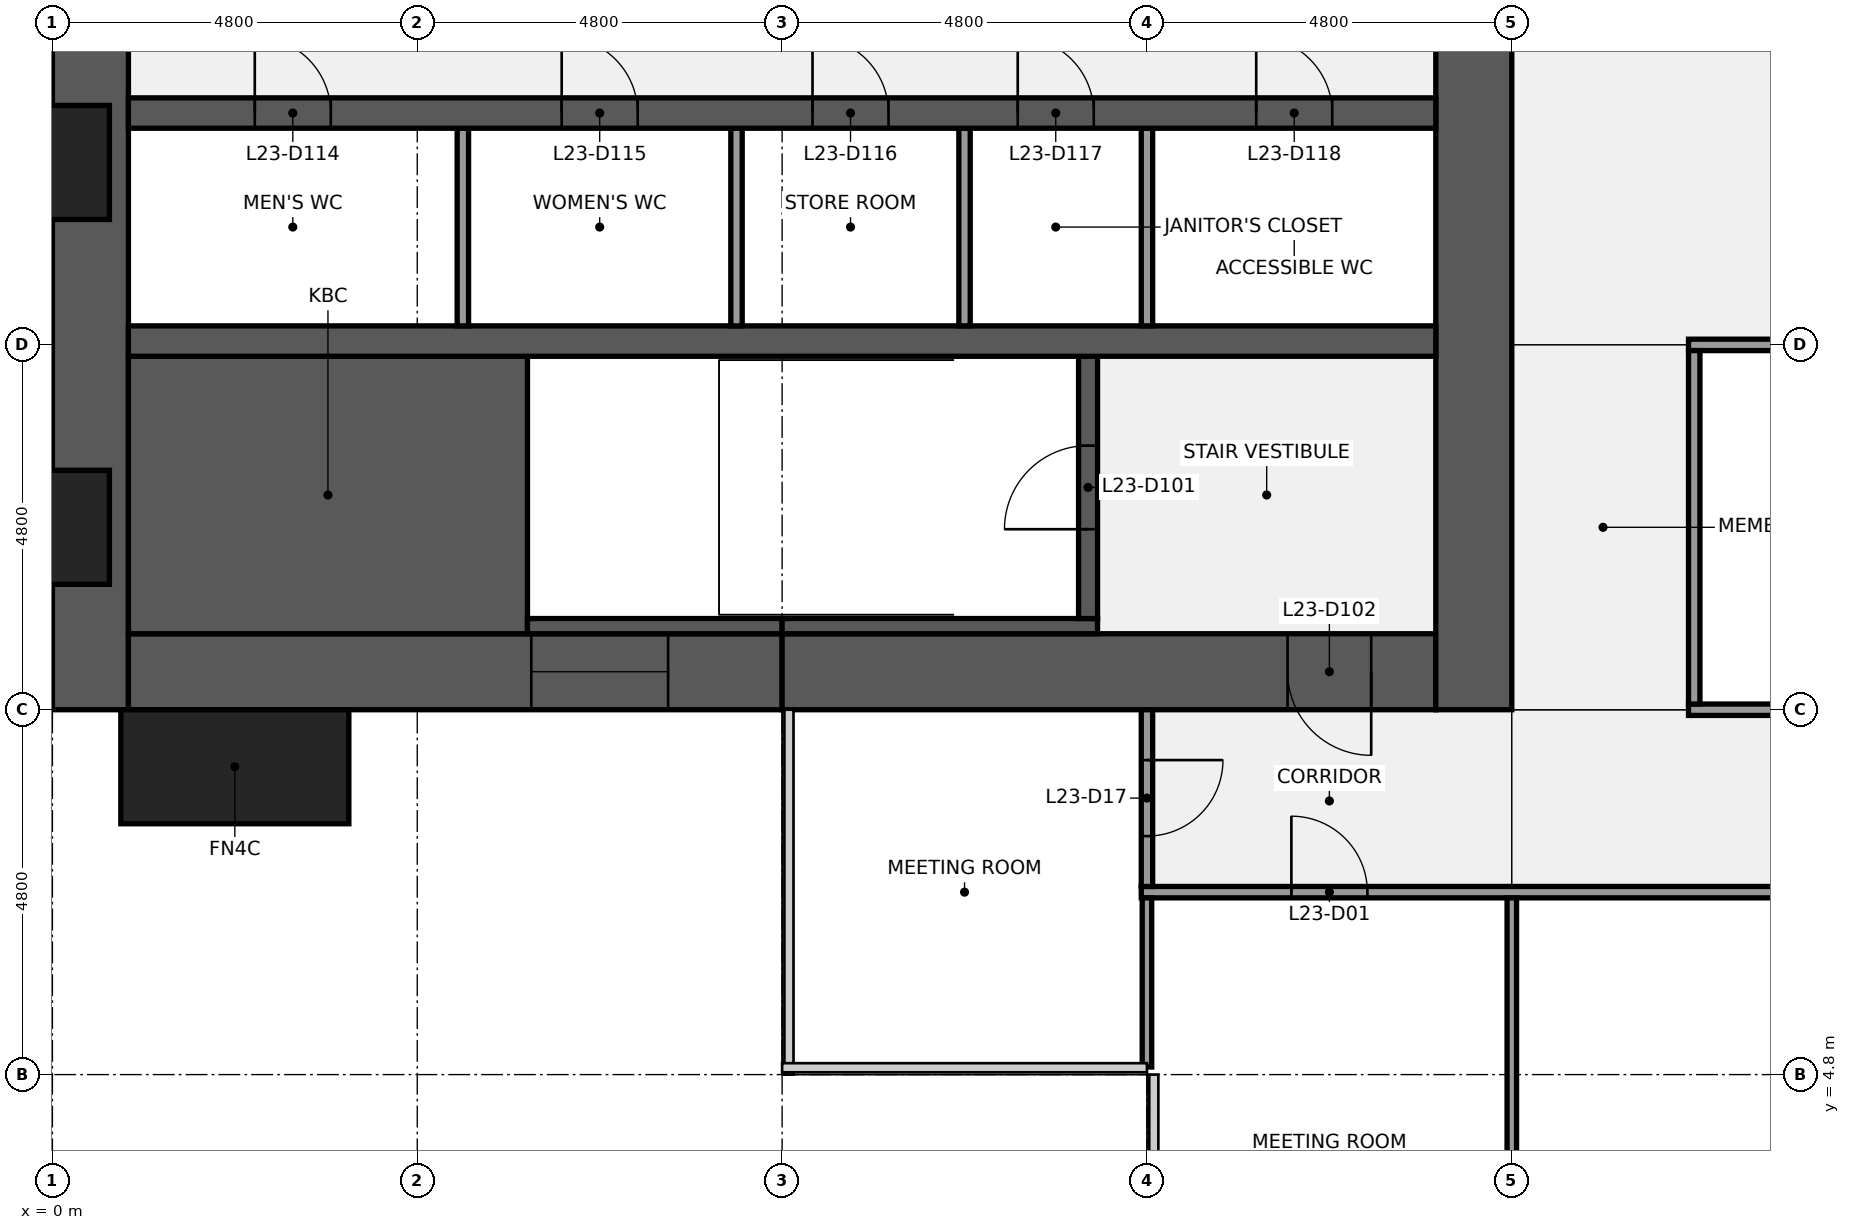
"""IFC4 building model, lengths in metres.
Left out: names, types, materials, properties, quantities, classifications, styles, units other than length and angle.
Written with IfcOpenShell. Run it as: python <this file> out.ifc"""

import sys

from ifc_helpers import new_model, si_unit, direction, frame, frame_2d, origin, origin_2d, place, context, subcontext, project, spatial, rectangle, extrude, element, fill, save


model = new_model("IFC4")
c1 = context("Model", 3, precision=1e-05, world=origin(), true_north=direction((0.0, 1.0)))
c2 = subcontext(c1, "Body", "Model", "MODEL_VIEW")
j1 = project(units=[si_unit("LENGTHUNIT", "METRE"), si_unit("PLANEANGLEUNIT", "RADIAN")], contexts=[c1])
p1 = place(None, origin())
s1 = spatial("IfcSite", under=j1, at=p1, CompositionType="ELEMENT")
p2 = place(p1, origin())
s2 = spatial("IfcBuilding", under=s1, at=p2, CompositionType="ELEMENT")
p3 = place(p2, frame((0.0, 0.0, 112.1)))
s3 = spatial("IfcBuildingStorey", under=s2, at=p3, CompositionType="ELEMENT", Elevation=112.1)
p4 = place(p3, frame((0.5, 9.6, 0.0), z_axis=(0.0, 0.0, 1.0), x_axis=(0.0, 1.0, 0.0)))
e1 = element("IfcWall", 1, at=p4, inside=s3, PredefinedType="SHEAR", context=c2, shape_type="SweptSolid", body=[
    extrude(rectangle(XDim=28.8, YDim=1.0, at=frame_2d((14.4, 0.0))), origin(), (0.0, 0.0, 1.0), 3.84),
])
p5 = place(p4, frame((8.85, 0.0, 0.9)))
e2 = element("IfcOpeningElement", 2, at=p5, cuts=e1, PredefinedType="OPENING", context=c2, shape_type="SweptSolid", body=[
    extrude(rectangle(XDim=1.5, YDim=1.5, at=frame_2d((0.75, 0.75))), frame((0.0, 0.51, 0.0), z_axis=(0.0, -1.0, 0.0), x_axis=(1.0, 0.0, 0.0)), (0.0, 0.0, 1.0), 1.02),
])
p6 = place(p4, frame((18.45, 0.0, 0.9)))
e3 = element("IfcOpeningElement", 3, at=p6, cuts=e1, PredefinedType="OPENING", context=c2, shape_type="SweptSolid", body=[
    extrude(rectangle(XDim=1.5, YDim=1.5, at=frame_2d((0.75, 0.75))), frame((0.0, 0.51, 0.0), z_axis=(0.0, -1.0, 0.0), x_axis=(1.0, 0.0, 0.0)), (0.0, 0.0, 1.0), 1.02),
])
p7 = place(p3, frame((9.6, 10.1, 0.0), z_axis=(0.0, 0.0, 1.0), x_axis=(-1.0, 0.0, 0.0)))
e4 = element("IfcWall", 4, at=p7, inside=s3, PredefinedType="SHEAR", context=c2, shape_type="SweptSolid", body=[
    extrude(rectangle(XDim=8.6, YDim=1.0, at=frame_2d((4.3, 0.0))), origin(), (0.0, 0.0, 1.0), 3.84),
])
p8 = place(p7, frame((1.5, 0.0, 0.9)))
e5 = element("IfcOpeningElement", 5, at=p8, cuts=e4, PredefinedType="OPENING", context=c2, shape_type="SweptSolid", body=[
    extrude(rectangle(XDim=1.8, YDim=1.5, at=frame_2d((0.9, 0.75))), frame((0.0, 0.51, 0.0), z_axis=(0.0, -1.0, 0.0), x_axis=(1.0, 0.0, 0.0)), (0.0, 0.0, 1.0), 1.02),
])
p9 = place(p3, frame((18.2, 10.1, 0.0), z_axis=(0.0, 0.0, 1.0), x_axis=(-1.0, 0.0, 0.0)))
e6 = element("IfcWall", 6, at=p9, inside=s3, PredefinedType="SHEAR", context=c2, shape_type="SweptSolid", body=[
    extrude(rectangle(XDim=8.6, YDim=1.0, at=frame_2d((4.3, 0.0))), origin(), (0.0, 0.0, 1.0), 3.84),
])
p10 = place(p9, frame((0.85, 0.0, 0.0)))
e7 = element("IfcOpeningElement", 7, at=p10, cuts=e6, PredefinedType="OPENING", context=c2, shape_type="SweptSolid", body=[
    extrude(rectangle(XDim=1.1, YDim=2.1, at=frame_2d((0.55, 1.05))), frame((0.0, 0.51, 0.0), z_axis=(0.0, -1.0, 0.0), x_axis=(1.0, 0.0, 0.0)), (0.0, 0.0, 1.0), 1.02),
])
p11 = place(p3, frame((18.7, 38.4, 0.0), z_axis=(0.0, 0.0, 1.0), x_axis=(0.0, -1.0, 0.0)))
e8 = element("IfcWall", 8, at=p11, inside=s3, PredefinedType="SHEAR", context=c2, shape_type="SweptSolid", body=[
    extrude(rectangle(XDim=28.8, YDim=1.0, at=frame_2d((14.4, 0.0))), origin(), (0.0, 0.0, 1.0), 3.84),
])
p12 = place(p11, frame((18.3, 0.0, 0.0)))
e9 = element("IfcOpeningElement", 9, at=p12, cuts=e8, PredefinedType="OPENING", context=c2, shape_type="SweptSolid", body=[
    extrude(rectangle(XDim=1.8, YDim=2.1, at=frame_2d((0.9, 1.05))), frame((0.0, 0.51, 0.0), z_axis=(0.0, -1.0, 0.0), x_axis=(1.0, 0.0, 0.0)), (0.0, 0.0, 1.0), 1.02),
])
p13 = place(p11, frame((8.7, 0.0, 0.0)))
e10 = element("IfcOpeningElement", 10, at=p13, cuts=e8, PredefinedType="OPENING", context=c2, shape_type="SweptSolid", body=[
    extrude(rectangle(XDim=1.8, YDim=2.1, at=frame_2d((0.9, 1.05))), frame((0.0, 0.51, 0.0), z_axis=(0.0, -1.0, 0.0), x_axis=(1.0, 0.0, 0.0)), (0.0, 0.0, 1.0), 1.02),
])
p14 = place(p3, frame((1.0, 12.425, 0.0), z_axis=(0.0, 0.0, 1.0), x_axis=(1.0, 0.0, 0.0)))
e11 = element("IfcWall", 11, at=p14, inside=s3, PredefinedType="SHEAR", context=c2, shape_type="SweptSolid", body=[
    extrude(rectangle(XDim=5.25, YDim=3.65, at=frame_2d((2.625, 0.0))), origin(), (0.0, 0.0, 1.0), 3.84),
])
p15 = place(p3, frame((6.25, 10.7, 0.0), z_axis=(0.0, 0.0, 1.0), x_axis=(1.0, 0.0, 0.0)))
e12 = element("IfcWall", 12, at=p15, inside=s3, PredefinedType="SHEAR", context=c2, shape_type="SweptSolid", body=[
    extrude(rectangle(XDim=3.35, YDim=0.2, at=frame_2d((1.675, 0.0))), origin(), (0.0, 0.0, 1.0), 3.84),
])
p16 = place(p3, frame((9.6, 10.7, 0.0), z_axis=(0.0, 0.0, 1.0), x_axis=(1.0, 0.0, 0.0)))
e13 = element("IfcWall", 13, at=p16, inside=s3, PredefinedType="SHEAR", context=c2, shape_type="SweptSolid", body=[
    extrude(rectangle(XDim=4.15, YDim=0.2, at=frame_2d((2.075, 0.0))), origin(), (0.0, 0.0, 1.0), 3.84),
])
p17 = place(p3, frame((13.625, 10.8, 0.0), z_axis=(0.0, 0.0, 1.0), x_axis=(0.0, 1.0, 0.0)))
e14 = element("IfcWall", 14, at=p17, inside=s3, PredefinedType="SHEAR", context=c2, shape_type="SweptSolid", body=[
    extrude(rectangle(XDim=3.45, YDim=0.25, at=frame_2d((1.725, 0.0))), origin(), (0.0, 0.0, 1.0), 3.84),
])
p18 = place(p17, frame((1.175, 0.0, 0.0)))
e15 = element("IfcOpeningElement", 15, at=p18, cuts=e14, PredefinedType="OPENING", context=c2, shape_type="SweptSolid", body=[
    extrude(rectangle(XDim=1.1, YDim=2.1, at=frame_2d((0.55, 1.05))), frame((0.0, 0.135, 0.0), z_axis=(0.0, -1.0, 0.0), x_axis=(1.0, 0.0, 0.0)), (0.0, 0.0, 1.0), 0.27),
])
p19 = place(p3, frame((1.0, 14.45, 0.0), z_axis=(0.0, 0.0, 1.0), x_axis=(1.0, 0.0, 0.0)))
e16 = element("IfcWall", 16, at=p19, inside=s3, PredefinedType="SHEAR", context=c2, shape_type="SweptSolid", body=[
    extrude(rectangle(XDim=17.2, YDim=0.4, at=frame_2d((8.6, 0.0))), origin(), (0.0, 0.0, 1.0), 3.84),
])
for number, where, z_axis, x_axis in (
    (17, (5.4, 14.65, 0.0), (0.0, 0.0, 1.0), (0.0, 1.0, 0.0)),
    (18, (9.0, 14.65, 0.0), (0.0, 0.0, 1.0), (0.0, 1.0, 0.0)),
    (19, (12.0, 14.65, 0.0), (0.0, 0.0, 1.0), (0.0, 1.0, 0.0)),
    (20, (14.4, 14.65, 0.0), (0.0, 0.0, 1.0), (0.0, 1.0, 0.0)),
):
    element("IfcWall", number, at=place(p3, frame(where, z_axis=z_axis, x_axis=x_axis)), inside=s3, PredefinedType="PARTITIONING", context=c2, shape_type="SweptSolid", body=[
        extrude(rectangle(XDim=2.6, YDim=0.15, at=frame_2d((1.3, 0.0))), origin(), (0.0, 0.0, 1.0), 3.84),
    ])
p20 = place(p3, frame((1.0, 17.45, 0.0), z_axis=(0.0, 0.0, 1.0), x_axis=(1.0, 0.0, 0.0)))
e21 = element("IfcWall", 21, at=p20, inside=s3, PredefinedType="SHEAR", context=c2, shape_type="SweptSolid", body=[
    extrude(rectangle(XDim=17.2, YDim=0.4, at=frame_2d((8.6, 0.0))), origin(), (0.0, 0.0, 1.0), 3.84),
])
p21 = place(p20, frame((1.663, 0.0, 0.0)))
e22 = element("IfcOpeningElement", 22, at=p21, cuts=e21, PredefinedType="OPENING", context=c2, shape_type="SweptSolid", body=[
    extrude(rectangle(XDim=1.0, YDim=2.1, at=frame_2d((0.5, 1.05))), frame((0.0, 0.21, 0.0), z_axis=(0.0, -1.0, 0.0), x_axis=(1.0, 0.0, 0.0)), (0.0, 0.0, 1.0), 0.42),
])
p22 = place(p20, frame((5.7, 0.0, 0.0)))
e23 = element("IfcOpeningElement", 23, at=p22, cuts=e21, PredefinedType="OPENING", context=c2, shape_type="SweptSolid", body=[
    extrude(rectangle(XDim=1.0, YDim=2.1, at=frame_2d((0.5, 1.05))), frame((0.0, 0.21, 0.0), z_axis=(0.0, -1.0, 0.0), x_axis=(1.0, 0.0, 0.0)), (0.0, 0.0, 1.0), 0.42),
])
p23 = place(p20, frame((9.0, 0.0, 0.0)))
e24 = element("IfcOpeningElement", 24, at=p23, cuts=e21, PredefinedType="OPENING", context=c2, shape_type="SweptSolid", body=[
    extrude(rectangle(XDim=1.0, YDim=2.1, at=frame_2d((0.5, 1.05))), frame((0.0, 0.21, 0.0), z_axis=(0.0, -1.0, 0.0), x_axis=(1.0, 0.0, 0.0)), (0.0, 0.0, 1.0), 0.42),
])
p24 = place(p20, frame((11.7, 0.0, 0.0)))
e25 = element("IfcOpeningElement", 25, at=p24, cuts=e21, PredefinedType="OPENING", context=c2, shape_type="SweptSolid", body=[
    extrude(rectangle(XDim=1.0, YDim=2.1, at=frame_2d((0.5, 1.05))), frame((0.0, 0.21, 0.0), z_axis=(0.0, -1.0, 0.0), x_axis=(1.0, 0.0, 0.0)), (0.0, 0.0, 1.0), 0.42),
])
p25 = place(p20, frame((14.837, 0.0, 0.0)))
e26 = element("IfcOpeningElement", 26, at=p25, cuts=e21, PredefinedType="OPENING", context=c2, shape_type="SweptSolid", body=[
    extrude(rectangle(XDim=1.0, YDim=2.1, at=frame_2d((0.5, 1.05))), frame((0.0, 0.21, 0.0), z_axis=(0.0, -1.0, 0.0), x_axis=(1.0, 0.0, 0.0)), (0.0, 0.0, 1.0), 0.42),
])
p26 = place(p3, frame((14.325, 7.2, 0.0), z_axis=(0.0, 0.0, 1.0), x_axis=(1.0, 0.0, 0.0)))
e27 = element("IfcWall", 27, at=p26, inside=s3, PredefinedType="PARTITIONING", context=c2, shape_type="SweptSolid", body=[
    extrude(rectangle(XDim=28.95, YDim=0.15, at=frame_2d((14.475, 0.0))), origin(), (0.0, 0.0, 1.0), 2.849),
])
p27 = place(p26, frame((1.975, 0.0, 0.0)))
e28 = element("IfcOpeningElement", 28, at=p27, cuts=e27, PredefinedType="OPENING", context=c2, shape_type="SweptSolid", body=[
    extrude(rectangle(XDim=1.0, YDim=2.1, at=frame_2d((0.5, 1.05))), frame((0.0, 0.085, 0.0), z_axis=(0.0, -1.0, 0.0), x_axis=(1.0, 0.0, 0.0)), (0.0, 0.0, 1.0), 0.17),
])
p28 = place(p26, frame((9.175, 0.0, 0.0)))
e29 = element("IfcOpeningElement", 29, at=p28, cuts=e27, PredefinedType="OPENING", context=c2, shape_type="SweptSolid", body=[
    extrude(rectangle(XDim=1.0, YDim=2.1, at=frame_2d((0.5, 1.05))), frame((0.0, 0.085, 0.0), z_axis=(0.0, -1.0, 0.0), x_axis=(1.0, 0.0, 0.0)), (0.0, 0.0, 1.0), 0.17),
])
p29 = place(p26, frame((18.775, 0.0, 0.0)))
e30 = element("IfcOpeningElement", 30, at=p29, cuts=e27, PredefinedType="OPENING", context=c2, shape_type="SweptSolid", body=[
    extrude(rectangle(XDim=1.0, YDim=2.1, at=frame_2d((0.5, 1.05))), frame((0.0, 0.085, 0.0), z_axis=(0.0, -1.0, 0.0), x_axis=(1.0, 0.0, 0.0)), (0.0, 0.0, 1.0), 0.17),
])
p30 = place(p26, frame((25.975, 0.0, 0.0)))
e31 = element("IfcOpeningElement", 31, at=p30, cuts=e27, PredefinedType="OPENING", context=c2, shape_type="SweptSolid", body=[
    extrude(rectangle(XDim=1.0, YDim=2.1, at=frame_2d((0.5, 1.05))), frame((0.0, 0.085, 0.0), z_axis=(0.0, -1.0, 0.0), x_axis=(1.0, 0.0, 0.0)), (0.0, 0.0, 1.0), 0.17),
])
p31 = place(p3, frame((21.525, 9.6, 0.0), z_axis=(0.0, 0.0, 1.0), x_axis=(1.0, 0.0, 0.0)))
e32 = element("IfcWall", 32, at=p31, inside=s3, PredefinedType="PARTITIONING", context=c2, shape_type="SweptSolid", body=[
    extrude(rectangle(XDim=14.55, YDim=0.15, at=frame_2d((7.275, 0.0))), origin(), (0.0, 0.0, 1.0), 2.849),
])
p32 = place(p31, frame((3.175, 0.0, 0.0)))
e33 = element("IfcOpeningElement", 33, at=p32, cuts=e32, PredefinedType="OPENING", context=c2, shape_type="SweptSolid", body=[
    extrude(rectangle(XDim=1.0, YDim=2.1, at=frame_2d((0.5, 1.05))), frame((0.0, 0.085, 0.0), z_axis=(0.0, -1.0, 0.0), x_axis=(1.0, 0.0, 0.0)), (0.0, 0.0, 1.0), 0.17),
])
p33 = place(p31, frame((10.375, 0.0, 0.0)))
e34 = element("IfcOpeningElement", 34, at=p33, cuts=e32, PredefinedType="OPENING", context=c2, shape_type="SweptSolid", body=[
    extrude(rectangle(XDim=1.0, YDim=2.1, at=frame_2d((0.5, 1.05))), frame((0.0, 0.085, 0.0), z_axis=(0.0, -1.0, 0.0), x_axis=(1.0, 0.0, 0.0)), (0.0, 0.0, 1.0), 0.17),
])
p34 = place(p3, frame((21.525, 14.4, 0.0), z_axis=(0.0, 0.0, 1.0), x_axis=(1.0, 0.0, 0.0)))
e35 = element("IfcWall", 35, at=p34, inside=s3, PredefinedType="PARTITIONING", context=c2, shape_type="SweptSolid", body=[
    extrude(rectangle(XDim=2.55, YDim=0.15, at=frame_2d((1.275, 0.0))), origin(), (0.0, 0.0, 1.0), 2.849),
])
p35 = place(p3, frame((14.4, 4.9, 0.0), z_axis=(0.0, 0.0, 1.0), x_axis=(0.0, 1.0, 0.0)))
e36 = element("IfcWall", 36, at=p35, inside=s3, PredefinedType="PARTITIONING", context=c2, shape_type="SweptSolid", body=[
    extrude(rectangle(XDim=2.225, YDim=0.125, at=frame_2d((1.113, 0.0))), origin(), (0.0, 0.0, 1.0), 2.849),
])
p36 = place(p3, frame((14.4, 7.275, 0.0), z_axis=(0.0, 0.0, 1.0), x_axis=(0.0, 1.0, 0.0)))
e37 = element("IfcWall", 37, at=p36, inside=s3, PredefinedType="PARTITIONING", context=c2, shape_type="SweptSolid", body=[
    extrude(rectangle(XDim=2.325, YDim=0.15, at=frame_2d((1.163, 0.0))), origin(), (0.0, 0.0, 1.0), 2.849),
])
p37 = place(p36, frame((0.663, 0.0, 0.0)))
e38 = element("IfcOpeningElement", 38, at=p37, cuts=e37, PredefinedType="OPENING", context=c2, shape_type="SweptSolid", body=[
    extrude(rectangle(XDim=1.0, YDim=2.1, at=frame_2d((0.5, 1.05))), frame((0.0, 0.085, 0.0), z_axis=(0.0, -1.0, 0.0), x_axis=(1.0, 0.0, 0.0)), (0.0, 0.0, 1.0), 0.17),
])
p38 = place(p3, frame((19.2, 0.6, 0.0), z_axis=(0.0, 0.0, 1.0), x_axis=(0.0, 1.0, 0.0)))
e39 = element("IfcWall", 39, at=p38, inside=s3, PredefinedType="PARTITIONING", context=c2, shape_type="SweptSolid", body=[
    extrude(rectangle(XDim=6.525, YDim=0.125, at=frame_2d((3.262, 0.0))), origin(), (0.0, 0.0, 1.0), 2.849),
])
p39 = place(p3, frame((21.6, 9.675, 0.0), z_axis=(0.0, 0.0, 1.0), x_axis=(0.0, 1.0, 0.0)))
e40 = element("IfcWall", 40, at=p39, inside=s3, PredefinedType="PARTITIONING", context=c2, shape_type="SweptSolid", body=[
    extrude(rectangle(XDim=4.65, YDim=0.15, at=frame_2d((2.325, 0.0))), origin(), (0.0, 0.0, 1.0), 2.849),
])
p40 = place(p3, frame((2.4, 8.85, 0.0), z_axis=(0.0, 0.0, 1.0), x_axis=(1.0, 0.0, 0.0)))
e41 = element("IfcColumn", 41, at=p40, inside=s3, PredefinedType="PILASTER", context=c2, shape_type="SweptSolid", body=[
    extrude(rectangle(XDim=3.0, YDim=1.5, at=origin_2d()), origin(), (0.0, 0.0, 1.0), 4.0),
])
p41 = place(p18, origin())
e42 = element("IfcDoor", 42, at=p41, inside=s3, OperationType="SINGLE_SWING_LEFT", PredefinedType="DOOR", context=c2, shape_type="SweptSolid", body=[
    extrude(rectangle(XDim=1.1, YDim=2.1, at=frame_2d((0.55, 1.05))), frame((0.0, 0.025, 0.0), z_axis=(0.0, -1.0, 0.0), x_axis=(1.0, 0.0, 0.0)), (0.0, 0.0, 1.0), 0.05),
])
fill(e15, e42)
p42 = place(p10, origin())
e43 = element("IfcDoor", 43, at=p42, inside=s3, OperationType="SINGLE_SWING_LEFT", PredefinedType="DOOR", context=c2, shape_type="SweptSolid", body=[
    extrude(rectangle(XDim=1.1, YDim=2.1, at=frame_2d((0.55, 1.05))), frame((0.0, 0.025, 0.0), z_axis=(0.0, -1.0, 0.0), x_axis=(1.0, 0.0, 0.0)), (0.0, 0.0, 1.0), 0.05),
])
fill(e7, e43)
p43 = place(p21, origin())
e44 = element("IfcDoor", 44, at=p43, inside=s3, OperationType="SINGLE_SWING_LEFT", PredefinedType="DOOR", context=c2, shape_type="SweptSolid", body=[
    extrude(rectangle(XDim=1.0, YDim=2.1, at=frame_2d((0.5, 1.05))), frame((0.0, 0.025, 0.0), z_axis=(0.0, -1.0, 0.0), x_axis=(1.0, 0.0, 0.0)), (0.0, 0.0, 1.0), 0.05),
])
fill(e22, e44)
p44 = place(p22, origin())
e45 = element("IfcDoor", 45, at=p44, inside=s3, OperationType="SINGLE_SWING_LEFT", PredefinedType="DOOR", context=c2, shape_type="SweptSolid", body=[
    extrude(rectangle(XDim=1.0, YDim=2.1, at=frame_2d((0.5, 1.05))), frame((0.0, 0.025, 0.0), z_axis=(0.0, -1.0, 0.0), x_axis=(1.0, 0.0, 0.0)), (0.0, 0.0, 1.0), 0.05),
])
fill(e23, e45)
p45 = place(p23, origin())
e46 = element("IfcDoor", 46, at=p45, inside=s3, OperationType="SINGLE_SWING_LEFT", PredefinedType="DOOR", context=c2, shape_type="SweptSolid", body=[
    extrude(rectangle(XDim=1.0, YDim=2.1, at=frame_2d((0.5, 1.05))), frame((0.0, 0.025, 0.0), z_axis=(0.0, -1.0, 0.0), x_axis=(1.0, 0.0, 0.0)), (0.0, 0.0, 1.0), 0.05),
])
fill(e24, e46)
p46 = place(p24, origin())
e47 = element("IfcDoor", 47, at=p46, inside=s3, OperationType="SINGLE_SWING_LEFT", PredefinedType="DOOR", context=c2, shape_type="SweptSolid", body=[
    extrude(rectangle(XDim=1.0, YDim=2.1, at=frame_2d((0.5, 1.05))), frame((0.0, 0.025, 0.0), z_axis=(0.0, -1.0, 0.0), x_axis=(1.0, 0.0, 0.0)), (0.0, 0.0, 1.0), 0.05),
])
fill(e25, e47)
p47 = place(p25, origin())
e48 = element("IfcDoor", 48, at=p47, inside=s3, OperationType="SINGLE_SWING_LEFT", PredefinedType="DOOR", context=c2, shape_type="SweptSolid", body=[
    extrude(rectangle(XDim=1.0, YDim=2.1, at=frame_2d((0.5, 1.05))), frame((0.0, 0.025, 0.0), z_axis=(0.0, -1.0, 0.0), x_axis=(1.0, 0.0, 0.0)), (0.0, 0.0, 1.0), 0.05),
])
fill(e26, e48)
p48 = place(p8, origin())
e49 = element("IfcWindow", 49, at=p48, inside=s3, PartitioningType="SINGLE_PANEL", PredefinedType="WINDOW", context=c2, shape_type="SweptSolid", body=[
    extrude(rectangle(XDim=1.8, YDim=1.5, at=frame_2d((0.9, 0.75))), frame((0.0, 0.03, 0.0), z_axis=(0.0, -1.0, 0.0), x_axis=(1.0, 0.0, 0.0)), (0.0, 0.0, 1.0), 0.06),
])
fill(e5, e49)
p49 = place(p27, origin())
e50 = element("IfcDoor", 50, at=p49, inside=s3, OperationType="SINGLE_SWING_LEFT", PredefinedType="DOOR", context=c2, shape_type="SweptSolid", body=[
    extrude(rectangle(XDim=1.0, YDim=2.1, at=frame_2d((0.5, 1.05))), frame((0.0, 0.025, 0.0), z_axis=(0.0, -1.0, 0.0), x_axis=(1.0, 0.0, 0.0)), (0.0, 0.0, 1.0), 0.05),
])
fill(e28, e50)
p50 = place(p37, origin())
e51 = element("IfcDoor", 51, at=p50, inside=s3, OperationType="SINGLE_SWING_RIGHT", PredefinedType="DOOR", context=c2, shape_type="SweptSolid", body=[
    extrude(rectangle(XDim=1.0, YDim=2.1, at=frame_2d((0.5, 1.05))), frame((0.0, 0.025, 0.0), z_axis=(0.0, -1.0, 0.0), x_axis=(1.0, 0.0, 0.0)), (0.0, 0.0, 1.0), 0.05),
])
fill(e38, e51)
save(model, sys.argv[1])
